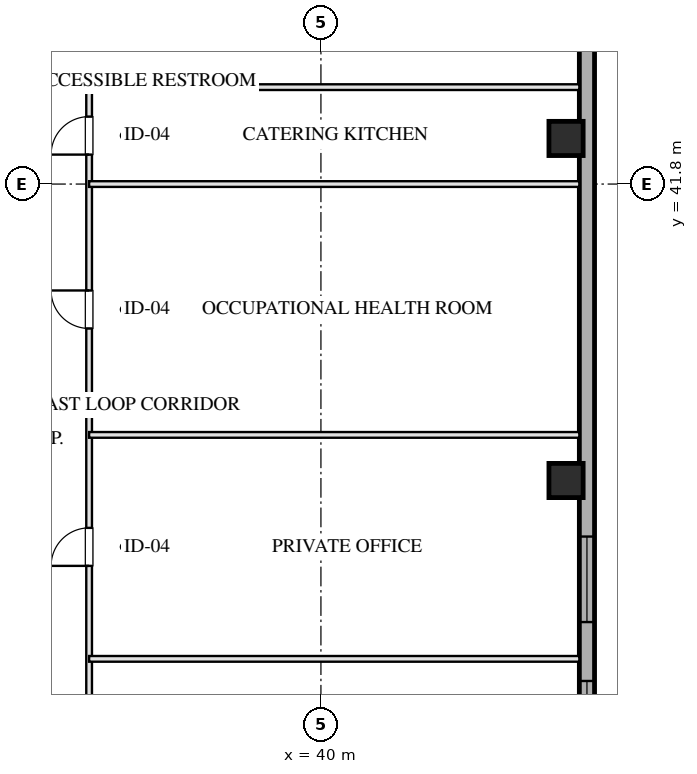
"""IFC4 building model, lengths in metres.
Left out: names, types, materials, properties, quantities, classifications, styles, units other than length and angle.
Written with IfcOpenShell. Run it as: python <this file> out.ifc"""

import sys

from ifc_helpers import new_model, si_unit, direction, frame, frame_2d, origin, origin_2d, place, context, subcontext, project, spatial, rectangle, hollow_rectangle, extrude, element, fill, save


model = new_model("IFC4")
c1 = context("Model", 3, precision=1e-05, world=origin(), true_north=direction((0.0, 1.0)))
c2 = subcontext(c1, "Body", "Model", "MODEL_VIEW")
j1 = project(units=[si_unit("LENGTHUNIT", "METRE"), si_unit("PLANEANGLEUNIT", "RADIAN")], contexts=[c1])
p1 = place(None, origin())
s1 = spatial("IfcSite", under=j1, at=p1, CompositionType="ELEMENT")
p2 = place(p1, origin())
s2 = spatial("IfcBuilding", under=s1, at=p2, CompositionType="ELEMENT")
p3 = place(p2, frame((0.0, 0.0, 170.2)))
s3 = spatial("IfcBuildingStorey", under=s2, at=p3, CompositionType="ELEMENT", Elevation=170.2)
for number, where, z_axis, x_axis in (
    (1, (46.45, 34.0, 0.0), (0.0, 0.0, 1.0), (1.0, 0.0, 0.0)),
    (2, (46.45, 43.0, 0.0), (0.0, 0.0, 1.0), (1.0, 0.0, 0.0)),
):
    element("IfcColumn", number, at=place(p3, frame(where, z_axis=z_axis, x_axis=x_axis)), inside=s3, PredefinedType="COLUMN", context=c2, shape_type="SweptSolid", body=[
        extrude(hollow_rectangle(XDim=0.9, YDim=0.9, WallThickness=0.032, at=origin_2d()), origin(), (0.0, 0.0, 1.0), 3.451),
    ])
p4 = place(p3, frame((47.0, 57.2, 0.0), z_axis=(0.0, 0.0, 1.0), x_axis=(0.0, -1.0, 0.0)))
e3 = element("IfcWall", 3, at=p4, inside=s3, PredefinedType="SOLIDWALL", context=c2, shape_type="SweptSolid", body=[
    extrude(rectangle(XDim=46.4, YDim=0.4, at=frame_2d((23.2, 0.0))), origin(), (0.0, 0.0, 1.0), 2.61),
])
p5 = place(p4, frame((28.475, 0.0, 0.75)))
e4 = element("IfcOpeningElement", 4, at=p5, cuts=e3, PredefinedType="OPENING", context=c2, shape_type="SweptSolid", body=[
    extrude(rectangle(XDim=2.25, YDim=1.46, at=frame_2d((1.125, 0.73))), frame((0.0, 0.21, 0.0), z_axis=(0.0, -1.0, 0.0), x_axis=(1.0, 0.0, 0.0)), (0.0, 0.0, 1.0), 0.42),
])
p6 = place(p4, frame((24.675, 0.0, 0.75)))
e5 = element("IfcOpeningElement", 5, at=p6, cuts=e3, PredefinedType="OPENING", context=c2, shape_type="SweptSolid", body=[
    extrude(rectangle(XDim=2.25, YDim=1.46, at=frame_2d((1.125, 0.73))), frame((0.0, 0.21, 0.0), z_axis=(0.0, -1.0, 0.0), x_axis=(1.0, 0.0, 0.0)), (0.0, 0.0, 1.0), 0.42),
])
p7 = place(p3, frame((33.9, 44.35, 0.0), z_axis=(0.0, 0.0, 1.0), x_axis=(1.0, 0.0, 0.0)))
e6 = element("IfcWall", 6, at=p7, inside=s3, PredefinedType="PARTITIONING", context=c2, shape_type="SweptSolid", body=[
    extrude(rectangle(XDim=12.9, YDim=0.15, at=frame_2d((6.45, 0.0))), origin(), (0.0, 0.0, 1.0), 3.175),
])
p8 = place(p3, frame((33.9, 23.65, 0.0), z_axis=(0.0, 0.0, 1.0), x_axis=(0.0, 1.0, 0.0)))
e7 = element("IfcWall", 7, at=p8, inside=s3, PredefinedType="PARTITIONING", context=c2, shape_type="SweptSolid", body=[
    extrude(rectangle(XDim=20.7, YDim=0.15, at=frame_2d((10.35, 0.0))), origin(), (0.0, 0.0, 1.0), 3.175),
])
p9 = place(p8, frame((2.329, 0.0, 0.0)))
e8 = element("IfcOpeningElement", 8, at=p9, cuts=e7, PredefinedType="OPENING", context=c2, shape_type="SweptSolid", body=[
    extrude(rectangle(XDim=1.05, YDim=2.05, at=frame_2d((0.525, 1.025))), frame((0.0, 0.085, 0.0), z_axis=(0.0, -1.0, 0.0), x_axis=(1.0, 0.0, 0.0)), (0.0, 0.0, 1.0), 0.17),
])
p10 = place(p8, frame((8.104, 0.0, 0.0)))
e9 = element("IfcOpeningElement", 9, at=p10, cuts=e7, PredefinedType="OPENING", context=c2, shape_type="SweptSolid", body=[
    extrude(rectangle(XDim=1.0, YDim=2.05, at=frame_2d((0.5, 1.025))), frame((0.0, 0.085, 0.0), z_axis=(0.0, -1.0, 0.0), x_axis=(1.0, 0.0, 0.0)), (0.0, 0.0, 1.0), 0.17),
])
p11 = place(p8, frame((14.35, 0.0, 0.0)))
e10 = element("IfcOpeningElement", 10, at=p11, cuts=e7, PredefinedType="OPENING", context=c2, shape_type="SweptSolid", body=[
    extrude(rectangle(XDim=1.0, YDim=2.05, at=frame_2d((0.5, 1.025))), frame((0.0, 0.085, 0.0), z_axis=(0.0, -1.0, 0.0), x_axis=(1.0, 0.0, 0.0)), (0.0, 0.0, 1.0), 0.17),
])
p12 = place(p8, frame((18.925, 0.0, 0.0)))
e11 = element("IfcOpeningElement", 11, at=p12, cuts=e7, PredefinedType="OPENING", context=c2, shape_type="SweptSolid", body=[
    extrude(rectangle(XDim=1.0, YDim=2.05, at=frame_2d((0.5, 1.025))), frame((0.0, 0.085, 0.0), z_axis=(0.0, -1.0, 0.0), x_axis=(1.0, 0.0, 0.0)), (0.0, 0.0, 1.0), 0.17),
])
for number, where, z_axis, x_axis in (
    (12, (33.9, 29.307, 0.0), (0.0, 0.0, 1.0), (1.0, 0.0, 0.0)),
    (13, (33.9, 35.2, 0.0), (0.0, 0.0, 1.0), (1.0, 0.0, 0.0)),
    (14, (33.9, 41.8, 0.0), (0.0, 0.0, 1.0), (1.0, 0.0, 0.0)),
):
    element("IfcWall", number, at=place(p3, frame(where, z_axis=z_axis, x_axis=x_axis)), inside=s3, PredefinedType="PARTITIONING", context=c2, shape_type="SweptSolid", body=[
        extrude(rectangle(XDim=12.9, YDim=0.15, at=frame_2d((6.45, 0.0))), origin(), (0.0, 0.0, 1.0), 3.175),
    ])
p13 = place(p5, origin())
e15 = element("IfcWindow", 15, at=p13, inside=s3, PartitioningType="TRIPLE_PANEL_VERTICAL", PredefinedType="WINDOW", context=c2, shape_type="SweptSolid", body=[
    extrude(rectangle(XDim=2.25, YDim=1.46, at=frame_2d((1.125, 0.73))), frame((0.0, 0.03, 0.0), z_axis=(0.0, -1.0, 0.0), x_axis=(1.0, 0.0, 0.0)), (0.0, 0.0, 1.0), 0.06),
])
fill(e4, e15)
p14 = place(p6, origin())
e16 = element("IfcWindow", 16, at=p14, inside=s3, PartitioningType="TRIPLE_PANEL_VERTICAL", PredefinedType="WINDOW", context=c2, shape_type="SweptSolid", body=[
    extrude(rectangle(XDim=2.25, YDim=1.46, at=frame_2d((1.125, 0.73))), frame((0.0, 0.03, 0.0), z_axis=(0.0, -1.0, 0.0), x_axis=(1.0, 0.0, 0.0)), (0.0, 0.0, 1.0), 0.06),
])
fill(e5, e16)
p15 = place(p10, origin())
e17 = element("IfcDoor", 17, at=p15, inside=s3, OperationType="SINGLE_SWING_LEFT", PredefinedType="DOOR", context=c2, shape_type="SweptSolid", body=[
    extrude(rectangle(XDim=1.0, YDim=2.05, at=frame_2d((0.5, 1.025))), frame((0.0, 0.025, 0.0), z_axis=(0.0, -1.0, 0.0), x_axis=(1.0, 0.0, 0.0)), (0.0, 0.0, 1.0), 0.05),
])
fill(e9, e17)
p16 = place(p11, origin())
e18 = element("IfcDoor", 18, at=p16, inside=s3, OperationType="SINGLE_SWING_RIGHT", PredefinedType="DOOR", context=c2, shape_type="SweptSolid", body=[
    extrude(rectangle(XDim=1.0, YDim=2.05, at=frame_2d((0.5, 1.025))), frame((0.0, 0.025, 0.0), z_axis=(0.0, -1.0, 0.0), x_axis=(1.0, 0.0, 0.0)), (0.0, 0.0, 1.0), 0.05),
])
fill(e10, e18)
p17 = place(p12, origin())
e19 = element("IfcDoor", 19, at=p17, inside=s3, OperationType="SINGLE_SWING_LEFT", PredefinedType="DOOR", context=c2, shape_type="SweptSolid", body=[
    extrude(rectangle(XDim=1.0, YDim=2.05, at=frame_2d((0.5, 1.025))), frame((0.0, 0.025, 0.0), z_axis=(0.0, -1.0, 0.0), x_axis=(1.0, 0.0, 0.0)), (0.0, 0.0, 1.0), 0.05),
])
fill(e11, e19)
save(model, sys.argv[1])
